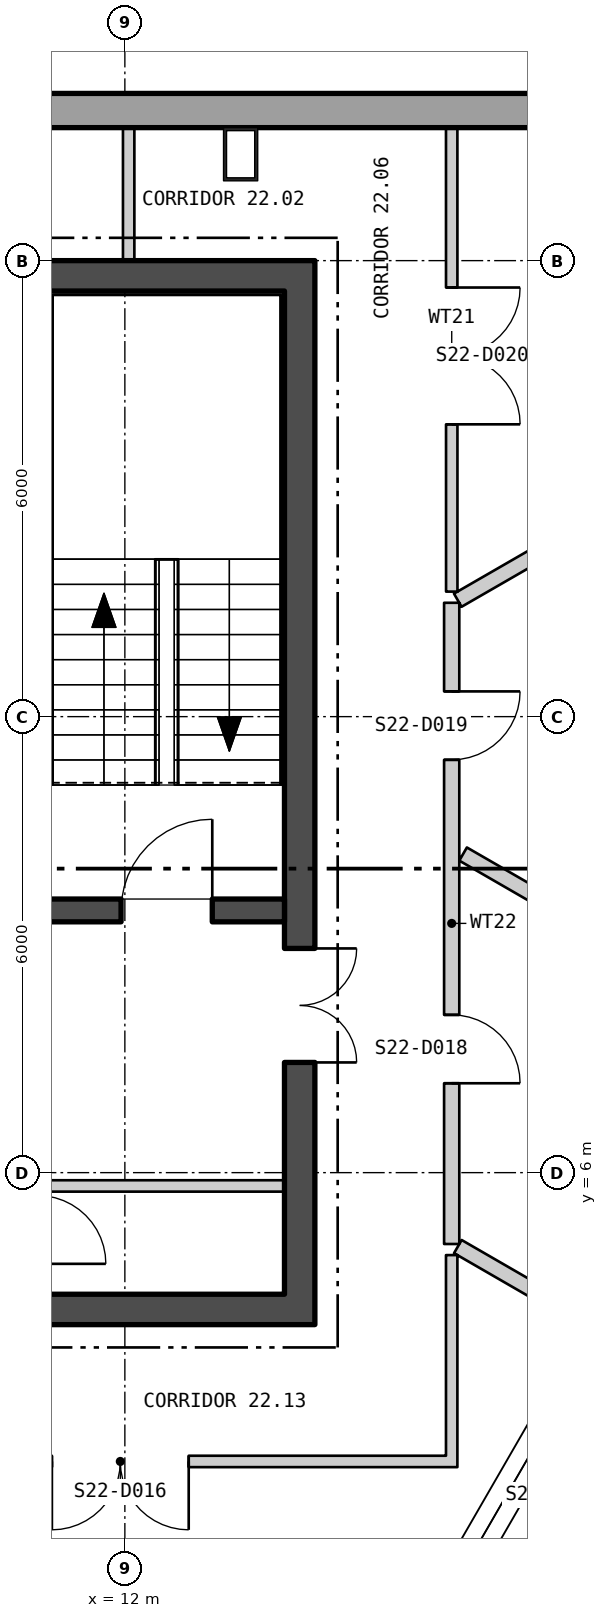
"""IFC4 building model, lengths in metres.
Left out: names, types, materials, properties, quantities, classifications, styles, units other than length and angle.
Written with IfcOpenShell. Run it as: python <this file> out.ifc"""

import sys

from ifc_helpers import new_model, si_unit, direction, frame, frame_2d, origin, origin_2d, place, context, subcontext, project, spatial, polyline, rectangle, hollow_rectangle, outline, extrude, element, fill, save


model = new_model("IFC4")
c1 = context("Model", 3, precision=1e-05, world=origin(), true_north=direction((0.0, 1.0)))
c2 = subcontext(c1, "Body", "Model", "MODEL_VIEW")
j1 = project(units=[si_unit("LENGTHUNIT", "METRE"), si_unit("PLANEANGLEUNIT", "RADIAN")], contexts=[c1])
p1 = place(None, origin())
s1 = spatial("IfcSite", under=j1, at=p1, CompositionType="ELEMENT")
p2 = place(p1, origin())
s2 = spatial("IfcBuilding", under=s1, at=p2, CompositionType="ELEMENT")
p3 = place(p2, frame((0.0, 0.0, 298.2)))
s3 = spatial("IfcBuildingStorey", under=s2, at=p3, CompositionType="ELEMENT", Elevation=298.2)
p4 = place(p3, frame((13.523, 19.4, 0.0), z_axis=(0.0, 0.0, 1.0), x_axis=(-1.0, 0.0, 0.0)))
e1 = element("IfcColumn", 1, at=p4, inside=s3, PredefinedType="COLUMN", context=c2, shape_type="SweptSolid", body=[
    extrude(hollow_rectangle(XDim=0.45, YDim=0.7, WallThickness=0.04, at=origin_2d()), origin(), (0.0, 0.0, 1.0), 6.0),
])
p5 = place(p3, frame((22.87, 19.975, -0.4), z_axis=(0.0, 0.0, 1.0), x_axis=(-1.0, 0.0, 0.0)))
e2 = element("IfcWall", 2, at=p5, inside=s3, PredefinedType="SOLIDWALL", context=c2, shape_type="SweptSolid", body=[
    extrude(outline(polyline([(-0.13, -0.225), (45.87, -0.225), (45.61, 0.225), (0.13, 0.225), (-0.13, -0.225)])), origin(), (0.0, 0.0, 1.0), 6.0),
])
p6 = place(p5, frame((1.424, 0.0, 1.3)))
e3 = element("IfcOpeningElement", 3, at=p6, cuts=e2, PredefinedType="OPENING", context=c2, shape_type="SweptSolid", body=[
    extrude(rectangle(XDim=2.4, YDim=4.1, at=frame_2d((1.2, 2.05))), frame((0.0, 0.235, 0.0), z_axis=(0.0, -1.0, 0.0), x_axis=(1.0, 0.0, 0.0)), (0.0, 0.0, 1.0), 0.47),
])
p7 = place(p5, frame((14.909, 0.0, 1.3)))
e4 = element("IfcOpeningElement", 4, at=p7, cuts=e2, PredefinedType="OPENING", context=c2, shape_type="SweptSolid", body=[
    extrude(rectangle(XDim=2.4, YDim=4.1, at=frame_2d((1.2, 2.05))), frame((0.0, 0.235, 0.0), z_axis=(0.0, -1.0, 0.0), x_axis=(1.0, 0.0, 0.0)), (0.0, 0.0, 1.0), 0.47),
])
p8 = place(p5, frame((19.416, 0.0, 1.3)))
e5 = element("IfcOpeningElement", 5, at=p8, cuts=e2, PredefinedType="OPENING", context=c2, shape_type="SweptSolid", body=[
    extrude(rectangle(XDim=2.4, YDim=4.1, at=frame_2d((1.2, 2.05))), frame((0.0, 0.235, 0.0), z_axis=(0.0, -1.0, 0.0), x_axis=(1.0, 0.0, 0.0)), (0.0, 0.0, 1.0), 0.47),
])
p9 = place(p5, frame((23.924, 0.0, 1.3)))
e6 = element("IfcOpeningElement", 6, at=p9, cuts=e2, PredefinedType="OPENING", context=c2, shape_type="SweptSolid", body=[
    extrude(rectangle(XDim=2.4, YDim=4.1, at=frame_2d((1.2, 2.05))), frame((0.0, 0.235, 0.0), z_axis=(0.0, -1.0, 0.0), x_axis=(1.0, 0.0, 0.0)), (0.0, 0.0, 1.0), 0.47),
])
p10 = place(p5, frame((28.431, 0.0, 1.3)))
e7 = element("IfcOpeningElement", 7, at=p10, cuts=e2, PredefinedType="OPENING", context=c2, shape_type="SweptSolid", body=[
    extrude(rectangle(XDim=2.4, YDim=4.1, at=frame_2d((1.2, 2.05))), frame((0.0, 0.235, 0.0), z_axis=(0.0, -1.0, 0.0), x_axis=(1.0, 0.0, 0.0)), (0.0, 0.0, 1.0), 0.47),
])
p11 = place(p5, frame((32.939, 0.0, 1.3)))
e8 = element("IfcOpeningElement", 8, at=p11, cuts=e2, PredefinedType="OPENING", context=c2, shape_type="SweptSolid", body=[
    extrude(rectangle(XDim=2.4, YDim=4.1, at=frame_2d((1.2, 2.05))), frame((0.0, 0.235, 0.0), z_axis=(0.0, -1.0, 0.0), x_axis=(1.0, 0.0, 0.0)), (0.0, 0.0, 1.0), 0.47),
])
p12 = place(p5, frame((41.916, 0.0, 1.3)))
e9 = element("IfcOpeningElement", 9, at=p12, cuts=e2, PredefinedType="OPENING", context=c2, shape_type="SweptSolid", body=[
    extrude(rectangle(XDim=2.4, YDim=4.1, at=frame_2d((1.2, 2.05))), frame((0.0, 0.235, 0.0), z_axis=(0.0, -1.0, 0.0), x_axis=(1.0, 0.0, 0.0)), (0.0, 0.0, 1.0), 0.47),
])
p13 = place(p3, frame((2.335, -23.682, -0.28), z_axis=(0.0, 0.0, 1.0), x_axis=(0.499999764979, 0.866025539474, 0.0)))
e10 = element("IfcWall", 10, at=p13, inside=s3, PredefinedType="SOLIDWALL", context=c2, shape_type="SweptSolid", body=[
    extrude(outline(polyline([(-0.13, -0.225), (45.87, -0.225), (45.61, 0.225), (0.13, 0.225), (-0.13, -0.225)])), origin(), (0.0, 0.0, 1.0), 6.1),
])
p14 = place(p13, frame((1.424, 0.0, 1.18)))
e11 = element("IfcOpeningElement", 11, at=p14, cuts=e10, PredefinedType="OPENING", context=c2, shape_type="SweptSolid", body=[
    extrude(rectangle(XDim=2.4, YDim=4.1, at=frame_2d((1.2, 2.05))), frame((0.0, 0.235, 0.0), z_axis=(0.0, -1.0, 0.0), x_axis=(1.0, 0.0, 0.0)), (0.0, 0.0, 1.0), 0.47),
])
p15 = place(p13, frame((5.893, 0.0, 1.18)))
e12 = element("IfcOpeningElement", 12, at=p15, cuts=e10, PredefinedType="OPENING", context=c2, shape_type="SweptSolid", body=[
    extrude(rectangle(XDim=2.4, YDim=4.1, at=frame_2d((1.2, 2.05))), frame((0.0, 0.235, 0.0), z_axis=(0.0, -1.0, 0.0), x_axis=(1.0, 0.0, 0.0)), (0.0, 0.0, 1.0), 0.47),
])
p16 = place(p13, frame((10.401, 0.0, 1.18)))
e13 = element("IfcOpeningElement", 13, at=p16, cuts=e10, PredefinedType="OPENING", context=c2, shape_type="SweptSolid", body=[
    extrude(rectangle(XDim=2.4, YDim=4.1, at=frame_2d((1.2, 2.05))), frame((0.0, 0.235, 0.0), z_axis=(0.0, -1.0, 0.0), x_axis=(1.0, 0.0, 0.0)), (0.0, 0.0, 1.0), 0.47),
])
p17 = place(p13, frame((14.909, 0.0, 1.18)))
e14 = element("IfcOpeningElement", 14, at=p17, cuts=e10, PredefinedType="OPENING", context=c2, shape_type="SweptSolid", body=[
    extrude(rectangle(XDim=2.4, YDim=4.1, at=frame_2d((1.2, 2.05))), frame((0.0, 0.235, 0.0), z_axis=(0.0, -1.0, 0.0), x_axis=(1.0, 0.0, 0.0)), (0.0, 0.0, 1.0), 0.47),
])
p18 = place(p13, frame((19.716, 0.0, 0.28)))
e15 = element("IfcOpeningElement", 15, at=p18, cuts=e10, PredefinedType="OPENING", context=c2, shape_type="SweptSolid", body=[
    extrude(rectangle(XDim=1.8, YDim=2.4, at=frame_2d((0.9, 1.2))), frame((0.0, 0.235, 0.0), z_axis=(0.0, -1.0, 0.0), x_axis=(1.0, 0.0, 0.0)), (0.0, 0.0, 1.0), 0.47),
])
p19 = place(p13, frame((24.224, 0.0, 0.28)))
e16 = element("IfcOpeningElement", 16, at=p19, cuts=e10, PredefinedType="OPENING", context=c2, shape_type="SweptSolid", body=[
    extrude(rectangle(XDim=1.8, YDim=2.4, at=frame_2d((0.9, 1.2))), frame((0.0, 0.235, 0.0), z_axis=(0.0, -1.0, 0.0), x_axis=(1.0, 0.0, 0.0)), (0.0, 0.0, 1.0), 0.47),
])
p20 = place(p13, frame((28.431, 0.0, 1.18)))
e17 = element("IfcOpeningElement", 17, at=p20, cuts=e10, PredefinedType="OPENING", context=c2, shape_type="SweptSolid", body=[
    extrude(rectangle(XDim=2.4, YDim=4.1, at=frame_2d((1.2, 2.05))), frame((0.0, 0.235, 0.0), z_axis=(0.0, -1.0, 0.0), x_axis=(1.0, 0.0, 0.0)), (0.0, 0.0, 1.0), 0.47),
])
p21 = place(p13, frame((32.939, 0.0, 1.18)))
e18 = element("IfcOpeningElement", 18, at=p21, cuts=e10, PredefinedType="OPENING", context=c2, shape_type="SweptSolid", body=[
    extrude(rectangle(XDim=2.4, YDim=4.1, at=frame_2d((1.2, 2.05))), frame((0.0, 0.235, 0.0), z_axis=(0.0, -1.0, 0.0), x_axis=(1.0, 0.0, 0.0)), (0.0, 0.0, 1.0), 0.47),
])
p22 = place(p13, frame((37.447, 0.0, 1.18)))
e19 = element("IfcOpeningElement", 19, at=p22, cuts=e10, PredefinedType="OPENING", context=c2, shape_type="SweptSolid", body=[
    extrude(rectangle(XDim=2.4, YDim=4.1, at=frame_2d((1.2, 2.05))), frame((0.0, 0.235, 0.0), z_axis=(0.0, -1.0, 0.0), x_axis=(1.0, 0.0, 0.0)), (0.0, 0.0, 1.0), 0.47),
])
p23 = place(p13, frame((41.916, 0.0, 1.18)))
e20 = element("IfcOpeningElement", 20, at=p23, cuts=e10, PredefinedType="OPENING", context=c2, shape_type="SweptSolid", body=[
    extrude(rectangle(XDim=2.4, YDim=4.1, at=frame_2d((1.2, 2.05))), frame((0.0, 0.235, 0.0), z_axis=(0.0, -1.0, 0.0), x_axis=(1.0, 0.0, 0.0)), (0.0, 0.0, 1.0), 0.47),
])
p24 = place(p3, frame((-14.5, 4.2, 0.0), z_axis=(0.0, 0.0, 1.0), x_axis=(1.0, 0.0, 0.0)))
e21 = element("IfcWall", 21, at=p24, inside=s3, PredefinedType="SHEAR", context=c2, shape_type="SweptSolid", body=[
    extrude(rectangle(XDim=29.0, YDim=0.4, at=frame_2d((14.5, 0.0))), origin(), (0.0, 0.0, 1.0), 5.8),
])
p25 = place(p24, frame((9.0, 0.0, 0.0)))
e22 = element("IfcOpeningElement", 22, at=p25, cuts=e21, PredefinedType="OPENING", context=c2, shape_type="SweptSolid", body=[
    extrude(rectangle(XDim=1.8, YDim=2.4, at=frame_2d((0.9, 1.2))), frame((0.0, 0.21, 0.0), z_axis=(0.0, -1.0, 0.0), x_axis=(1.0, 0.0, 0.0)), (0.0, 0.0, 1.0), 0.42),
])
p26 = place(p24, frame((19.0, 0.0, 0.0)))
e23 = element("IfcOpeningElement", 23, at=p26, cuts=e21, PredefinedType="OPENING", context=c2, shape_type="SweptSolid", body=[
    extrude(rectangle(XDim=1.8, YDim=2.4, at=frame_2d((0.9, 1.2))), frame((0.0, 0.21, 0.0), z_axis=(0.0, -1.0, 0.0), x_axis=(1.0, 0.0, 0.0)), (0.0, 0.0, 1.0), 0.42),
])
p27 = place(p3, frame((-14.5, 17.8, 0.0), z_axis=(0.0, 0.0, 1.0), x_axis=(1.0, 0.0, 0.0)))
e24 = element("IfcWall", 24, at=p27, inside=s3, PredefinedType="SHEAR", context=c2, shape_type="SweptSolid", body=[
    extrude(rectangle(XDim=29.0, YDim=0.4, at=frame_2d((14.5, 0.0))), origin(), (0.0, 0.0, 1.0), 5.8),
])
p28 = place(p3, frame((14.3, 4.4, 0.0), z_axis=(0.0, 0.0, 1.0), x_axis=(0.0, 1.0, 0.0)))
e25 = element("IfcWall", 25, at=p28, inside=s3, PredefinedType="SHEAR", context=c2, shape_type="SweptSolid", body=[
    extrude(rectangle(XDim=13.2, YDim=0.4, at=frame_2d((6.6, 0.0))), origin(), (0.0, 0.0, 1.0), 5.8),
])
p29 = place(p28, frame((3.05, 0.0, 0.0)))
e26 = element("IfcOpeningElement", 26, at=p29, cuts=e25, PredefinedType="OPENING", context=c2, shape_type="SweptSolid", body=[
    extrude(rectangle(XDim=1.5, YDim=2.1, at=frame_2d((0.75, 1.05))), frame((0.0, 0.21, 0.0), z_axis=(0.0, -1.0, 0.0), x_axis=(1.0, 0.0, 0.0)), (0.0, 0.0, 1.0), 0.42),
])
p30 = place(p3, frame((11.0, 9.45, 0.0), z_axis=(0.0, 0.0, 1.0), x_axis=(1.0, 0.0, 0.0)))
e27 = element("IfcWall", 27, at=p30, inside=s3, PredefinedType="SHEAR", context=c2, shape_type="SweptSolid", body=[
    extrude(rectangle(XDim=3.1, YDim=0.3, at=frame_2d((1.55, 0.0))), origin(), (0.0, 0.0, 1.0), 5.8),
])
p31 = place(p30, frame((0.95, 0.0, 0.0)))
e28 = element("IfcOpeningElement", 28, at=p31, cuts=e27, PredefinedType="OPENING", context=c2, shape_type="SweptSolid", body=[
    extrude(rectangle(XDim=1.2, YDim=2.1, at=frame_2d((0.6, 1.05))), frame((0.0, 0.16, 0.0), z_axis=(0.0, -1.0, 0.0), x_axis=(1.0, 0.0, 0.0)), (0.0, 0.0, 1.0), 0.32),
])
p32 = place(p3, frame((11.0, 5.825, 0.0), z_axis=(0.0, 0.0, 1.0), x_axis=(1.0, 0.0, 0.0)))
e29 = element("IfcWall", 29, at=p32, inside=s3, PredefinedType="PARTITIONING", context=c2, shape_type="SweptSolid", body=[
    extrude(rectangle(XDim=3.1, YDim=0.15, at=frame_2d((1.55, 0.0))), origin(), (0.0, 0.0, 1.0), 5.8),
])
p33 = place(p3, frame((7.705, 2.2, 0.0), z_axis=(0.0, 0.0, 1.0), x_axis=(1.0, 0.0, 0.0)))
e30 = element("IfcWall", 30, at=p33, inside=s3, PredefinedType="PARTITIONING", context=c2, shape_type="SweptSolid", body=[
    extrude(rectangle(XDim=8.67, YDim=0.15, at=frame_2d((4.335, 0.0))), origin(), (0.0, 0.0, 1.0), 5.8),
])
p34 = place(p33, frame((3.335, 0.0, 0.0)))
e31 = element("IfcOpeningElement", 31, at=p34, cuts=e30, PredefinedType="OPENING", context=c2, shape_type="SweptSolid", body=[
    extrude(rectangle(XDim=1.8, YDim=2.1, at=frame_2d((0.9, 1.05))), frame((0.0, 0.085, 0.0), z_axis=(0.0, -1.0, 0.0), x_axis=(1.0, 0.0, 0.0)), (0.0, 0.0, 1.0), 0.17),
])
p35 = place(p3, frame((12.05, 18.0, 0.0), z_axis=(0.0, 0.0, 1.0), x_axis=(0.0, 1.0, 0.0)))
e32 = element("IfcWall", 32, at=p35, inside=s3, PredefinedType="PARTITIONING", context=c2, shape_type="SweptSolid", body=[
    extrude(rectangle(XDim=1.75, YDim=0.15, at=frame_2d((0.875, 0.0))), origin(), (0.0, 0.0, 1.0), 5.8),
])
p36 = place(p3, frame((16.3, 2.275, 0.0), z_axis=(0.0, 0.0, 1.0), x_axis=(0.0, 1.0, 0.0)))
e33 = element("IfcWall", 33, at=p36, inside=s3, PredefinedType="PARTITIONING", context=c2, shape_type="SweptSolid", body=[
    extrude(rectangle(XDim=2.64, YDim=0.15, at=frame_2d((1.32, 0.0))), origin(), (0.0, 0.0, 1.0), 5.8),
])
p37 = place(p3, frame((16.3, 5.061, 0.0), z_axis=(0.0, 0.0, 1.0), x_axis=(0.0, 1.0, 0.0)))
e34 = element("IfcWall", 34, at=p37, inside=s3, PredefinedType="PARTITIONING", context=c2, shape_type="SweptSolid", body=[
    extrude(rectangle(XDim=8.437, YDim=0.2, at=frame_2d((4.218, 0.0))), origin(), (0.0, 0.0, 1.0), 5.8),
])
p38 = place(p37, frame((2.115, 0.0, 0.0)))
e35 = element("IfcOpeningElement", 35, at=p38, cuts=e34, PredefinedType="OPENING", context=c2, shape_type="SweptSolid", body=[
    extrude(rectangle(XDim=0.9, YDim=2.1, at=frame_2d((0.45, 1.05))), frame((0.0, 0.11, 0.0), z_axis=(0.0, -1.0, 0.0), x_axis=(1.0, 0.0, 0.0)), (0.0, 0.0, 1.0), 0.22),
])
p39 = place(p37, frame((6.371, 0.0, 0.0)))
e36 = element("IfcOpeningElement", 36, at=p39, cuts=e34, PredefinedType="OPENING", context=c2, shape_type="SweptSolid", body=[
    extrude(rectangle(XDim=0.9, YDim=2.1, at=frame_2d((0.45, 1.05))), frame((0.0, 0.11, 0.0), z_axis=(0.0, -1.0, 0.0), x_axis=(1.0, 0.0, 0.0)), (0.0, 0.0, 1.0), 0.22),
])
p40 = place(p3, frame((16.3, 19.748, 0.0), z_axis=(0.0, 0.0, 1.0), x_axis=(0.00016385384, -0.999999986576, 0.0)))
e37 = element("IfcWall", 37, at=p40, inside=s3, PredefinedType="PARTITIONING", context=c2, shape_type="SweptSolid", body=[
    extrude(rectangle(XDim=6.103, YDim=0.15, at=frame_2d((3.051, 0.0))), origin(), (0.0, 0.0, 1.0), 5.8),
])
p41 = place(p40, frame((2.102, 0.0, 0.0)))
e38 = element("IfcOpeningElement", 38, at=p41, cuts=e37, PredefinedType="OPENING", context=c2, shape_type="SweptSolid", body=[
    extrude(rectangle(XDim=1.8, YDim=2.1, at=frame_2d((0.9, 1.05))), frame((0.0, 0.085, 0.0), z_axis=(0.0, -1.0, 0.0), x_axis=(1.0, 0.0, 0.0)), (0.0, 0.0, 1.0), 0.17),
])
p42 = place(p3, frame((16.38, 13.532, 0.0), z_axis=(0.0, 0.0, 1.0), x_axis=(0.866289053052, 0.499543067775, 0.0)))
e39 = element("IfcWall", 39, at=p42, inside=s3, PredefinedType="PARTITIONING", context=c2, shape_type="SweptSolid", body=[
    extrude(rectangle(XDim=1.77, YDim=0.2, at=frame_2d((0.885, 0.0))), origin(), (0.0, 0.0, 1.0), 5.8),
])
p43 = place(p3, frame((16.381, 5.027, 0.0), z_axis=(0.0, 0.0, 1.0), x_axis=(0.865877778751, -0.500255606931, 0.0)))
e40 = element("IfcWall", 40, at=p43, inside=s3, PredefinedType="PARTITIONING", context=c2, shape_type="SweptSolid", body=[
    extrude(rectangle(XDim=1.515, YDim=0.2, at=frame_2d((0.758, 0.0))), origin(), (0.0, 0.0, 1.0), 5.8),
])
p44 = place(p3, frame((16.45, 10.192, 0.0), z_axis=(0.0, 0.0, 1.0), x_axis=(0.866024748725, -0.500001134594, 0.0)))
e41 = element("IfcWall", 41, at=p44, inside=s3, PredefinedType="PARTITIONING", context=c2, shape_type="SweptSolid", body=[
    extrude(rectangle(XDim=4.038, YDim=0.2, at=frame_2d((2.019, 0.0))), origin(), (0.0, 0.0, 1.0), 5.8),
])
p45 = place(p20, origin())
e42 = element("IfcWindow", 42, at=p45, inside=s3, PartitioningType="SINGLE_PANEL", PredefinedType="WINDOW", context=c2, shape_type="SweptSolid", body=[
    extrude(rectangle(XDim=2.4, YDim=4.1, at=frame_2d((1.2, 2.05))), frame((0.0, 0.105, 0.0), z_axis=(0.0, -1.0, 0.0), x_axis=(1.0, 0.0, 0.0)), (0.0, 0.0, 1.0), 0.06),
])
fill(e17, e42)
p46 = place(p31, origin())
e43 = element("IfcDoor", 43, at=p46, inside=s3, OperationType="SINGLE_SWING_LEFT", PredefinedType="DOOR", context=c2, shape_type="SweptSolid", body=[
    extrude(rectangle(XDim=1.2, YDim=2.1, at=frame_2d((0.6, 1.05))), frame((0.0, 0.025, 0.0), z_axis=(0.0, -1.0, 0.0), x_axis=(1.0, 0.0, 0.0)), (0.0, 0.0, 1.0), 0.05),
])
fill(e28, e43)
p47 = place(p29, origin())
e44 = element("IfcDoor", 44, at=p47, inside=s3, OperationType="DOUBLE_DOOR_SINGLE_SWING", PredefinedType="DOOR", context=c2, shape_type="SweptSolid", body=[
    extrude(rectangle(XDim=1.5, YDim=2.1, at=frame_2d((0.75, 1.05))), frame((0.0, 0.025, 0.0), z_axis=(0.0, -1.0, 0.0), x_axis=(1.0, 0.0, 0.0)), (0.0, 0.0, 1.0), 0.05),
])
fill(e26, e44)
p48 = place(p34, origin())
e45 = element("IfcDoor", 45, at=p48, inside=s3, OperationType="DOUBLE_DOOR_SINGLE_SWING", PredefinedType="DOOR", context=c2, shape_type="SweptSolid", body=[
    extrude(rectangle(XDim=1.8, YDim=2.1, at=frame_2d((0.9, 1.05))), frame((0.0, 0.025, 0.0), z_axis=(0.0, -1.0, 0.0), x_axis=(1.0, 0.0, 0.0)), (0.0, 0.0, 1.0), 0.05),
])
fill(e31, e45)
p49 = place(p38, origin())
e46 = element("IfcDoor", 46, at=p49, inside=s3, OperationType="SINGLE_SWING_LEFT", PredefinedType="DOOR", context=c2, shape_type="SweptSolid", body=[
    extrude(rectangle(XDim=0.9, YDim=2.1, at=frame_2d((0.45, 1.05))), frame((0.0, 0.025, 0.0), z_axis=(0.0, -1.0, 0.0), x_axis=(1.0, 0.0, 0.0)), (0.0, 0.0, 1.0), 0.05),
])
fill(e35, e46)
p50 = place(p39, origin())
e47 = element("IfcDoor", 47, at=p50, inside=s3, OperationType="SINGLE_SWING_RIGHT", PredefinedType="DOOR", context=c2, shape_type="SweptSolid", body=[
    extrude(rectangle(XDim=0.9, YDim=2.1, at=frame_2d((0.45, 1.05))), frame((0.0, 0.025, 0.0), z_axis=(0.0, -1.0, 0.0), x_axis=(1.0, 0.0, 0.0)), (0.0, 0.0, 1.0), 0.05),
])
fill(e36, e47)
p51 = place(p41, origin())
e48 = element("IfcDoor", 48, at=p51, inside=s3, OperationType="DOUBLE_DOOR_SINGLE_SWING", PredefinedType="DOOR", context=c2, shape_type="SweptSolid", body=[
    extrude(rectangle(XDim=1.8, YDim=2.1, at=frame_2d((0.9, 1.05))), frame((0.0, 0.025, 0.0), z_axis=(0.0, -1.0, 0.0), x_axis=(1.0, 0.0, 0.0)), (0.0, 0.0, 1.0), 0.05),
])
fill(e38, e48)
save(model, sys.argv[1])
